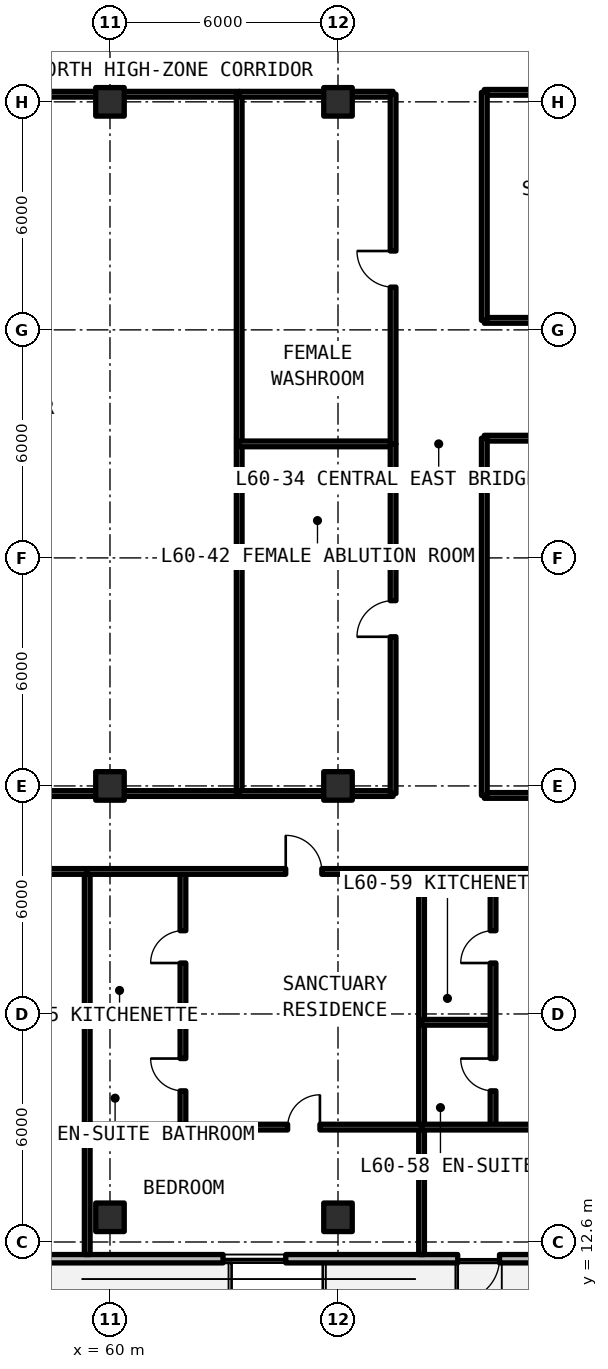
"""IFC4 building model, lengths in metres.
Left out: names, types, materials, properties, quantities, classifications, styles, units other than length and angle.
Written with IfcOpenShell. Run it as: python <this file> out.ifc"""

import sys

from ifc_helpers import new_model, si_unit, direction, frame, frame_2d, origin, origin_2d, place, context, subcontext, project, spatial, rectangle, extrude, element, fill, save


model = new_model("IFC4")
c1 = context("Model", 3, precision=1e-05, world=origin(), true_north=direction((0.0, 1.0)))
c2 = subcontext(c1, "Body", "Model", "MODEL_VIEW")
j1 = project(units=[si_unit("LENGTHUNIT", "METRE"), si_unit("PLANEANGLEUNIT", "RADIAN")], contexts=[c1])
p1 = place(None, origin())
s1 = spatial("IfcSite", under=j1, at=p1, CompositionType="ELEMENT")
p2 = place(p1, origin())
s2 = spatial("IfcBuilding", under=s1, at=p2, CompositionType="ELEMENT")
p3 = place(p2, frame((0.0, 0.0, 215.49)))
s3 = spatial("IfcBuildingStorey", under=s2, at=p3, CompositionType="ELEMENT", Elevation=215.49)
for number, where, z_axis, x_axis in (
    (1, (60.0, 24.6, 0.0), (0.0, 0.0, 1.0), (1.0, 0.0, 0.0)),
    (2, (60.0, 42.6, 0.0), (0.0, 0.0, 1.0), (1.0, 0.0, 0.0)),
    (3, (66.0, 24.6, 0.0), (0.0, 0.0, 1.0), (1.0, 0.0, 0.0)),
    (4, (66.0, 42.6, 0.0), (0.0, 0.0, 1.0), (1.0, 0.0, 0.0)),
    (5, (60.0, 13.25, 0.0), (0.0, 0.0, 1.0), (1.0, 0.0, 0.0)),
    (6, (66.0, 13.25, 0.0), (0.0, 0.0, 1.0), (1.0, 0.0, 0.0)),
):
    element("IfcColumn", number, at=place(p3, frame(where, z_axis=z_axis, x_axis=x_axis)), inside=s3, PredefinedType="COLUMN", context=c2, shape_type="SweptSolid", body=[
        extrude(rectangle(XDim=0.75, YDim=0.75, at=origin_2d()), origin(), (0.0, 0.0, 1.0), 3.63),
    ])
p4 = place(p3, frame((52.11, 12.16, 0.0), z_axis=(0.0, 0.0, 1.0), x_axis=(1.0, 0.0, 0.0)))
e7 = element("IfcWall", 7, at=p4, inside=s3, PredefinedType="SOLIDWALL", context=c2, shape_type="SweptSolid", body=[
    extrude(rectangle(XDim=43.244, YDim=0.22, at=frame_2d((21.622, 0.0))), origin(), (0.0, 0.0, 1.0), 3.41),
])
p5 = place(p4, frame((4.94, 0.0, 0.0)))
e8 = element("IfcOpeningElement", 8, at=p5, cuts=e7, PredefinedType="OPENING", context=c2, shape_type="SweptSolid", body=[
    extrude(rectangle(XDim=1.1, YDim=2.15, at=frame_2d((0.55, 1.075))), frame((0.0, 0.12, 0.0), z_axis=(0.0, -1.0, 0.0), x_axis=(1.0, 0.0, 0.0)), (0.0, 0.0, 1.0), 0.24),
])
p6 = place(p4, frame((17.04, 0.0, 0.0)))
e9 = element("IfcOpeningElement", 9, at=p6, cuts=e7, PredefinedType="OPENING", context=c2, shape_type="SweptSolid", body=[
    extrude(rectangle(XDim=1.1, YDim=2.15, at=frame_2d((0.55, 1.075))), frame((0.0, 0.12, 0.0), z_axis=(0.0, -1.0, 0.0), x_axis=(1.0, 0.0, 0.0)), (0.0, 0.0, 1.0), 0.24),
])
p7 = place(p4, frame((28.89, 0.0, 0.0)))
e10 = element("IfcOpeningElement", 10, at=p7, cuts=e7, PredefinedType="OPENING", context=c2, shape_type="SweptSolid", body=[
    extrude(rectangle(XDim=1.1, YDim=2.15, at=frame_2d((0.55, 1.075))), frame((0.0, 0.12, 0.0), z_axis=(0.0, -1.0, 0.0), x_axis=(1.0, 0.0, 0.0)), (0.0, 0.0, 1.0), 0.24),
])
p8 = place(p4, frame((10.865, 0.0, 0.78)))
e11 = element("IfcOpeningElement", 11, at=p8, cuts=e7, PredefinedType="OPENING", context=c2, shape_type="SweptSolid", body=[
    extrude(rectangle(XDim=1.65, YDim=1.66, at=frame_2d((0.825, 0.83))), frame((0.0, 0.12, 0.0), z_axis=(0.0, -1.0, 0.0), x_axis=(1.0, 0.0, 0.0)), (0.0, 0.0, 1.0), 0.24),
])
p9 = place(p4, frame((38.666, 0.0, 0.78)))
e12 = element("IfcOpeningElement", 12, at=p9, cuts=e7, PredefinedType="OPENING", context=c2, shape_type="SweptSolid", body=[
    extrude(rectangle(XDim=1.65, YDim=1.66, at=frame_2d((0.825, 0.83))), frame((0.0, 0.12, 0.0), z_axis=(0.0, -1.0, 0.0), x_axis=(1.0, 0.0, 0.0)), (0.0, 0.0, 1.0), 0.24),
])
p10 = place(p3, frame((69.85, 24.35, 0.0), z_axis=(0.0, 0.0, 1.0), x_axis=(1.0, 0.0, 0.0)))
e13 = element("IfcWall", 13, at=p10, inside=s3, PredefinedType="SOLIDWALL", context=c2, shape_type="SweptSolid", body=[
    extrude(rectangle(XDim=7.905, YDim=0.15, at=frame_2d((3.952, 0.0))), origin(), (0.0, 0.0, 1.0), 2.63),
])
p11 = place(p3, frame((69.85, 33.75, 0.0), z_axis=(0.0, 0.0, 1.0), x_axis=(1.0, 0.0, 0.0)))
e14 = element("IfcWall", 14, at=p11, inside=s3, PredefinedType="SOLIDWALL", context=c2, shape_type="SweptSolid", body=[
    extrude(rectangle(XDim=7.905, YDim=0.15, at=frame_2d((3.952, 0.0))), origin(), (0.0, 0.0, 1.0), 2.63),
])
p12 = place(p11, frame((3.478, 0.0, 0.0)))
e15 = element("IfcOpeningElement", 15, at=p12, cuts=e14, PredefinedType="OPENING", context=c2, shape_type="SweptSolid", body=[
    extrude(rectangle(XDim=0.95, YDim=2.15, at=frame_2d((0.475, 1.075))), frame((0.0, 0.085, 0.0), z_axis=(0.0, -1.0, 0.0), x_axis=(1.0, 0.0, 0.0)), (0.0, 0.0, 1.0), 0.17),
])
p13 = place(p3, frame((69.85, 24.35, 0.0), z_axis=(0.0, 0.0, 1.0), x_axis=(0.0, 1.0, 0.0)))
e16 = element("IfcWall", 16, at=p13, inside=s3, PredefinedType="SOLIDWALL", context=c2, shape_type="SweptSolid", body=[
    extrude(rectangle(XDim=9.4, YDim=0.15, at=frame_2d((4.7, 0.0))), origin(), (0.0, 0.0, 1.0), 2.63),
])
p14 = place(p3, frame((69.85, 36.85, 0.0), z_axis=(0.0, 0.0, 1.0), x_axis=(1.0, 0.0, 0.0)))
e17 = element("IfcWall", 17, at=p14, inside=s3, PredefinedType="SOLIDWALL", context=c2, shape_type="SweptSolid", body=[
    extrude(rectangle(XDim=7.905, YDim=0.15, at=frame_2d((3.952, 0.0))), origin(), (0.0, 0.0, 1.0), 2.63),
])
p15 = place(p14, frame((3.478, 0.0, 0.0)))
e18 = element("IfcOpeningElement", 18, at=p15, cuts=e17, PredefinedType="OPENING", context=c2, shape_type="SweptSolid", body=[
    extrude(rectangle(XDim=0.95, YDim=2.15, at=frame_2d((0.475, 1.075))), frame((0.0, 0.085, 0.0), z_axis=(0.0, -1.0, 0.0), x_axis=(1.0, 0.0, 0.0)), (0.0, 0.0, 1.0), 0.17),
])
p16 = place(p3, frame((69.85, 42.85, 0.0), z_axis=(0.0, 0.0, 1.0), x_axis=(1.0, 0.0, 0.0)))
e19 = element("IfcWall", 19, at=p16, inside=s3, PredefinedType="SOLIDWALL", context=c2, shape_type="SweptSolid", body=[
    extrude(rectangle(XDim=7.905, YDim=0.15, at=frame_2d((3.952, 0.0))), origin(), (0.0, 0.0, 1.0), 2.63),
])
p17 = place(p3, frame((69.85, 36.85, 0.0), z_axis=(0.0, 0.0, 1.0), x_axis=(0.0, 1.0, 0.0)))
e20 = element("IfcWall", 20, at=p17, inside=s3, PredefinedType="SOLIDWALL", context=c2, shape_type="SweptSolid", body=[
    extrude(rectangle(XDim=6.0, YDim=0.15, at=frame_2d((3.0, 0.0))), origin(), (0.0, 0.0, 1.0), 2.63),
])
p18 = place(p3, frame((50.6, 24.4, 0.0), z_axis=(0.0, 0.0, 1.0), x_axis=(1.0, 0.0, 0.0)))
e21 = element("IfcWall", 21, at=p18, inside=s3, PredefinedType="SOLIDWALL", context=c2, shape_type="SweptSolid", body=[
    extrude(rectangle(XDim=12.8, YDim=0.15, at=frame_2d((6.4, 0.0))), origin(), (0.0, 0.0, 1.0), 2.63),
])
p19 = place(p18, frame((5.7, 0.0, 0.0)))
e22 = element("IfcOpeningElement", 22, at=p19, cuts=e21, PredefinedType="OPENING", context=c2, shape_type="SweptSolid", body=[
    extrude(rectangle(XDim=1.4, YDim=2.15, at=frame_2d((0.7, 1.075))), frame((0.0, 0.085, 0.0), z_axis=(0.0, -1.0, 0.0), x_axis=(1.0, 0.0, 0.0)), (0.0, 0.0, 1.0), 0.17),
])
p20 = place(p3, frame((50.6, 42.8, 0.0), z_axis=(0.0, 0.0, 1.0), x_axis=(1.0, 0.0, 0.0)))
e23 = element("IfcWall", 23, at=p20, inside=s3, PredefinedType="SOLIDWALL", context=c2, shape_type="SweptSolid", body=[
    extrude(rectangle(XDim=12.8, YDim=0.15, at=frame_2d((6.4, 0.0))), origin(), (0.0, 0.0, 1.0), 2.63),
])
p21 = place(p3, frame((63.4, 24.4, 0.0), z_axis=(0.0, 0.0, 1.0), x_axis=(0.0, 1.0, 0.0)))
e24 = element("IfcWall", 24, at=p21, inside=s3, PredefinedType="SOLIDWALL", context=c2, shape_type="SweptSolid", body=[
    extrude(rectangle(XDim=18.4, YDim=0.15, at=frame_2d((9.2, 0.0))), origin(), (0.0, 0.0, 1.0), 2.63),
])
for number, where, z_axis, x_axis in (
    (25, (63.4, 24.4, 0.0), (0.0, 0.0, 1.0), (1.0, 0.0, 0.0)),
    (26, (63.4, 33.6, 0.0), (0.0, 0.0, 1.0), (1.0, 0.0, 0.0)),
):
    element("IfcWall", number, at=place(p3, frame(where, z_axis=z_axis, x_axis=x_axis)), inside=s3, PredefinedType="SOLIDWALL", context=c2, shape_type="SweptSolid", body=[
        extrude(rectangle(XDim=4.05, YDim=0.15, at=frame_2d((2.025, 0.0))), origin(), (0.0, 0.0, 1.0), 2.63),
    ])
p22 = place(p3, frame((67.45, 24.4, 0.0), z_axis=(0.0, 0.0, 1.0), x_axis=(0.0, 1.0, 0.0)))
e27 = element("IfcWall", 27, at=p22, inside=s3, PredefinedType="SOLIDWALL", context=c2, shape_type="SweptSolid", body=[
    extrude(rectangle(XDim=9.2, YDim=0.15, at=frame_2d((4.6, 0.0))), origin(), (0.0, 0.0, 1.0), 2.63),
])
p23 = place(p22, frame((4.125, 0.0, 0.0)))
e28 = element("IfcOpeningElement", 28, at=p23, cuts=e27, PredefinedType="OPENING", context=c2, shape_type="SweptSolid", body=[
    extrude(rectangle(XDim=0.95, YDim=2.15, at=frame_2d((0.475, 1.075))), frame((0.0, 0.085, 0.0), z_axis=(0.0, -1.0, 0.0), x_axis=(1.0, 0.0, 0.0)), (0.0, 0.0, 1.0), 0.17),
])
p24 = place(p3, frame((63.4, 42.8, 0.0), z_axis=(0.0, 0.0, 1.0), x_axis=(1.0, 0.0, 0.0)))
e29 = element("IfcWall", 29, at=p24, inside=s3, PredefinedType="SOLIDWALL", context=c2, shape_type="SweptSolid", body=[
    extrude(rectangle(XDim=4.05, YDim=0.15, at=frame_2d((2.025, 0.0))), origin(), (0.0, 0.0, 1.0), 2.63),
])
p25 = place(p3, frame((67.45, 33.6, 0.0), z_axis=(0.0, 0.0, 1.0), x_axis=(0.0, 1.0, 0.0)))
e30 = element("IfcWall", 30, at=p25, inside=s3, PredefinedType="SOLIDWALL", context=c2, shape_type="SweptSolid", body=[
    extrude(rectangle(XDim=9.2, YDim=0.15, at=frame_2d((4.6, 0.0))), origin(), (0.0, 0.0, 1.0), 2.63),
])
p26 = place(p25, frame((4.125, 0.0, 0.0)))
e31 = element("IfcOpeningElement", 31, at=p26, cuts=e30, PredefinedType="OPENING", context=c2, shape_type="SweptSolid", body=[
    extrude(rectangle(XDim=0.95, YDim=2.15, at=frame_2d((0.475, 1.075))), frame((0.0, 0.085, 0.0), z_axis=(0.0, -1.0, 0.0), x_axis=(1.0, 0.0, 0.0)), (0.0, 0.0, 1.0), 0.17),
])
p27 = place(p3, frame((59.401, 12.27, 0.0), z_axis=(0.0, 0.0, 1.0), x_axis=(0.0, 1.0, 0.0)))
e32 = element("IfcWall", 32, at=p27, inside=s3, PredefinedType="SOLIDWALL", context=c2, shape_type="SweptSolid", body=[
    extrude(rectangle(XDim=10.08, YDim=0.15, at=frame_2d((5.04, 0.0))), origin(), (0.0, 0.0, 1.0), 2.63),
])
p28 = place(p3, frame((52.12, 22.35, 0.0), z_axis=(0.0, 0.0, 1.0), x_axis=(1.0, 0.0, 0.0)))
e33 = element("IfcWall", 33, at=p28, inside=s3, PredefinedType="SOLIDWALL", context=c2, shape_type="SweptSolid", body=[
    extrude(rectangle(XDim=7.281, YDim=0.15, at=frame_2d((3.641, 0.0))), origin(), (0.0, 0.0, 1.0), 2.63),
])
p29 = place(p28, frame((3.166, 0.0, 0.0)))
e34 = element("IfcOpeningElement", 34, at=p29, cuts=e33, PredefinedType="OPENING", context=c2, shape_type="SweptSolid", body=[
    extrude(rectangle(XDim=0.95, YDim=2.15, at=frame_2d((0.475, 1.075))), frame((0.0, 0.085, 0.0), z_axis=(0.0, -1.0, 0.0), x_axis=(1.0, 0.0, 0.0)), (0.0, 0.0, 1.0), 0.17),
])
p30 = place(p3, frame((68.199, 12.27, 0.0), z_axis=(0.0, 0.0, 1.0), x_axis=(0.0, 1.0, 0.0)))
e35 = element("IfcWall", 35, at=p30, inside=s3, PredefinedType="SOLIDWALL", context=c2, shape_type="SweptSolid", body=[
    extrude(rectangle(XDim=10.08, YDim=0.15, at=frame_2d((5.04, 0.0))), origin(), (0.0, 0.0, 1.0), 2.63),
])
p31 = place(p3, frame((59.401, 18.381, 0.0), z_axis=(0.0, 0.0, 1.0), x_axis=(1.0, 0.0, 0.0)))
e36 = element("IfcWall", 36, at=p31, inside=s3, PredefinedType="PARTITIONING", context=c2, shape_type="SweptSolid", body=[
    extrude(rectangle(XDim=2.519, YDim=0.15, at=frame_2d((1.259, 0.0))), origin(), (0.0, 0.0, 1.0), 2.63),
])
p32 = place(p3, frame((61.92, 15.623, 0.0), z_axis=(0.0, 0.0, 1.0), x_axis=(0.0, 1.0, 0.0)))
e37 = element("IfcWall", 37, at=p32, inside=s3, PredefinedType="PARTITIONING", context=c2, shape_type="SweptSolid", body=[
    extrude(rectangle(XDim=6.727, YDim=0.15, at=frame_2d((3.364, 0.0))), origin(), (0.0, 0.0, 1.0), 2.63),
])
p33 = place(p32, frame((0.954, 0.0, 0.0)))
e38 = element("IfcOpeningElement", 38, at=p33, cuts=e37, PredefinedType="OPENING", context=c2, shape_type="SweptSolid", body=[
    extrude(rectangle(XDim=0.85, YDim=2.1, at=frame_2d((0.425, 1.05))), frame((0.0, 0.085, 0.0), z_axis=(0.0, -1.0, 0.0), x_axis=(1.0, 0.0, 0.0)), (0.0, 0.0, 1.0), 0.17),
])
p34 = place(p32, frame((4.318, 0.0, 0.0)))
e39 = element("IfcOpeningElement", 39, at=p34, cuts=e37, PredefinedType="OPENING", context=c2, shape_type="SweptSolid", body=[
    extrude(rectangle(XDim=0.85, YDim=2.1, at=frame_2d((0.425, 1.05))), frame((0.0, 0.085, 0.0), z_axis=(0.0, -1.0, 0.0), x_axis=(1.0, 0.0, 0.0)), (0.0, 0.0, 1.0), 0.17),
])
p35 = place(p3, frame((59.401, 15.623, 0.0), z_axis=(0.0, 0.0, 1.0), x_axis=(1.0, 0.0, 0.0)))
e40 = element("IfcWall", 40, at=p35, inside=s3, PredefinedType="PARTITIONING", context=c2, shape_type="SweptSolid", body=[
    extrude(rectangle(XDim=8.798, YDim=0.15, at=frame_2d((4.399, 0.0))), origin(), (0.0, 0.0, 1.0), 2.63),
])
p36 = place(p35, frame((5.273, 0.0, 0.0)))
e41 = element("IfcOpeningElement", 41, at=p36, cuts=e40, PredefinedType="OPENING", context=c2, shape_type="SweptSolid", body=[
    extrude(rectangle(XDim=0.85, YDim=2.1, at=frame_2d((0.425, 1.05))), frame((0.0, 0.085, 0.0), z_axis=(0.0, -1.0, 0.0), x_axis=(1.0, 0.0, 0.0)), (0.0, 0.0, 1.0), 0.17),
])
p37 = place(p3, frame((59.401, 22.35, 0.0), z_axis=(0.0, 0.0, 1.0), x_axis=(1.0, 0.0, 0.0)))
e42 = element("IfcWall", 42, at=p37, inside=s3, PredefinedType="SOLIDWALL", context=c2, shape_type="SweptSolid", body=[
    extrude(rectangle(XDim=8.798, YDim=0.15, at=frame_2d((4.399, 0.0))), origin(), (0.0, 0.0, 1.0), 2.63),
])
p38 = place(p37, frame((5.223, 0.0, 0.0)))
e43 = element("IfcOpeningElement", 43, at=p38, cuts=e42, PredefinedType="OPENING", context=c2, shape_type="SweptSolid", body=[
    extrude(rectangle(XDim=0.95, YDim=2.15, at=frame_2d((0.475, 1.075))), frame((0.0, 0.085, 0.0), z_axis=(0.0, -1.0, 0.0), x_axis=(1.0, 0.0, 0.0)), (0.0, 0.0, 1.0), 0.17),
])
p39 = place(p3, frame((68.199, 18.381, 0.0), z_axis=(0.0, 0.0, 1.0), x_axis=(1.0, 0.0, 0.0)))
e44 = element("IfcWall", 44, at=p39, inside=s3, PredefinedType="PARTITIONING", context=c2, shape_type="SweptSolid", body=[
    extrude(rectangle(XDim=1.881, YDim=0.15, at=frame_2d((0.94, 0.0))), origin(), (0.0, 0.0, 1.0), 2.63),
])
p40 = place(p3, frame((70.08, 15.623, 0.0), z_axis=(0.0, 0.0, 1.0), x_axis=(0.0, 1.0, 0.0)))
e45 = element("IfcWall", 45, at=p40, inside=s3, PredefinedType="PARTITIONING", context=c2, shape_type="SweptSolid", body=[
    extrude(rectangle(XDim=6.727, YDim=0.15, at=frame_2d((3.364, 0.0))), origin(), (0.0, 0.0, 1.0), 2.63),
])
p41 = place(p40, frame((0.954, 0.0, 0.0)))
e46 = element("IfcOpeningElement", 46, at=p41, cuts=e45, PredefinedType="OPENING", context=c2, shape_type="SweptSolid", body=[
    extrude(rectangle(XDim=0.85, YDim=2.1, at=frame_2d((0.425, 1.05))), frame((0.0, 0.085, 0.0), z_axis=(0.0, -1.0, 0.0), x_axis=(1.0, 0.0, 0.0)), (0.0, 0.0, 1.0), 0.17),
])
p42 = place(p40, frame((4.318, 0.0, 0.0)))
e47 = element("IfcOpeningElement", 47, at=p42, cuts=e45, PredefinedType="OPENING", context=c2, shape_type="SweptSolid", body=[
    extrude(rectangle(XDim=0.85, YDim=2.1, at=frame_2d((0.425, 1.05))), frame((0.0, 0.085, 0.0), z_axis=(0.0, -1.0, 0.0), x_axis=(1.0, 0.0, 0.0)), (0.0, 0.0, 1.0), 0.17),
])
p43 = place(p3, frame((68.199, 15.623, 0.0), z_axis=(0.0, 0.0, 1.0), x_axis=(1.0, 0.0, 0.0)))
e48 = element("IfcWall", 48, at=p43, inside=s3, PredefinedType="PARTITIONING", context=c2, shape_type="SweptSolid", body=[
    extrude(rectangle(XDim=8.798, YDim=0.15, at=frame_2d((4.399, 0.0))), origin(), (0.0, 0.0, 1.0), 2.63),
])
p44 = place(p43, frame((4.954, 0.0, 0.0)))
e49 = element("IfcOpeningElement", 49, at=p44, cuts=e48, PredefinedType="OPENING", context=c2, shape_type="SweptSolid", body=[
    extrude(rectangle(XDim=0.85, YDim=2.1, at=frame_2d((0.425, 1.05))), frame((0.0, 0.085, 0.0), z_axis=(0.0, -1.0, 0.0), x_axis=(1.0, 0.0, 0.0)), (0.0, 0.0, 1.0), 0.17),
])
p45 = place(p3, frame((68.199, 22.35, 0.0), z_axis=(0.0, 0.0, 1.0), x_axis=(1.0, 0.0, 0.0)))
e50 = element("IfcWall", 50, at=p45, inside=s3, PredefinedType="SOLIDWALL", context=c2, shape_type="SweptSolid", body=[
    extrude(rectangle(XDim=8.798, YDim=0.15, at=frame_2d((4.399, 0.0))), origin(), (0.0, 0.0, 1.0), 2.63),
])
p46 = place(p45, frame((4.904, 0.0, 0.0)))
e51 = element("IfcOpeningElement", 51, at=p46, cuts=e50, PredefinedType="OPENING", context=c2, shape_type="SweptSolid", body=[
    extrude(rectangle(XDim=0.95, YDim=2.15, at=frame_2d((0.475, 1.075))), frame((0.0, 0.085, 0.0), z_axis=(0.0, -1.0, 0.0), x_axis=(1.0, 0.0, 0.0)), (0.0, 0.0, 1.0), 0.17),
])
p47 = place(p6, frame((1.1, 0.0, 0.0), z_axis=(0.0, 0.0, 1.0), x_axis=(-1.0, 0.0, 0.0)))
e52 = element("IfcDoor", 52, at=p47, inside=s3, OperationType="SINGLE_SWING_LEFT", PredefinedType="DOOR", context=c2, shape_type="SweptSolid", body=[
    extrude(rectangle(XDim=1.1, YDim=2.15, at=frame_2d((0.55, 1.075))), frame((0.0, 0.025, 0.0), z_axis=(0.0, -1.0, 0.0), x_axis=(1.0, 0.0, 0.0)), (0.0, 0.0, 1.0), 0.05),
])
fill(e9, e52)
p48 = place(p8, origin())
e53 = element("IfcWindow", 53, at=p48, inside=s3, PartitioningType="SINGLE_PANEL", PredefinedType="WINDOW", context=c2, shape_type="SweptSolid", body=[
    extrude(rectangle(XDim=1.65, YDim=1.66, at=frame_2d((0.825, 0.83))), frame((0.0, 0.03, 0.0), z_axis=(0.0, -1.0, 0.0), x_axis=(1.0, 0.0, 0.0)), (0.0, 0.0, 1.0), 0.06),
])
fill(e11, e53)
p49 = place(p23, origin())
e54 = element("IfcDoor", 54, at=p49, inside=s3, OperationType="SINGLE_SWING_LEFT", PredefinedType="DOOR", context=c2, shape_type="SweptSolid", body=[
    extrude(rectangle(XDim=0.95, YDim=2.15, at=frame_2d((0.475, 1.075))), frame((0.0, 0.025, 0.0), z_axis=(0.0, -1.0, 0.0), x_axis=(1.0, 0.0, 0.0)), (0.0, 0.0, 1.0), 0.05),
])
fill(e28, e54)
p50 = place(p26, origin())
e55 = element("IfcDoor", 55, at=p50, inside=s3, OperationType="SINGLE_SWING_RIGHT", PredefinedType="DOOR", context=c2, shape_type="SweptSolid", body=[
    extrude(rectangle(XDim=0.95, YDim=2.15, at=frame_2d((0.475, 1.075))), frame((0.0, 0.025, 0.0), z_axis=(0.0, -1.0, 0.0), x_axis=(1.0, 0.0, 0.0)), (0.0, 0.0, 1.0), 0.05),
])
fill(e31, e55)
p51 = place(p33, origin())
e56 = element("IfcDoor", 56, at=p51, inside=s3, OperationType="SINGLE_SWING_RIGHT", PredefinedType="DOOR", context=c2, shape_type="SweptSolid", body=[
    extrude(rectangle(XDim=0.85, YDim=2.1, at=frame_2d((0.425, 1.05))), frame((0.0, 0.025, 0.0), z_axis=(0.0, -1.0, 0.0), x_axis=(1.0, 0.0, 0.0)), (0.0, 0.0, 1.0), 0.05),
])
fill(e38, e56)
p52 = place(p34, origin())
e57 = element("IfcDoor", 57, at=p52, inside=s3, OperationType="SINGLE_SWING_LEFT", PredefinedType="DOOR", context=c2, shape_type="SweptSolid", body=[
    extrude(rectangle(XDim=0.85, YDim=2.1, at=frame_2d((0.425, 1.05))), frame((0.0, 0.025, 0.0), z_axis=(0.0, -1.0, 0.0), x_axis=(1.0, 0.0, 0.0)), (0.0, 0.0, 1.0), 0.05),
])
fill(e39, e57)
p53 = place(p36, origin())
e58 = element("IfcDoor", 58, at=p53, inside=s3, OperationType="SINGLE_SWING_RIGHT", PredefinedType="DOOR", context=c2, shape_type="SweptSolid", body=[
    extrude(rectangle(XDim=0.85, YDim=2.1, at=frame_2d((0.425, 1.05))), frame((0.0, 0.025, 0.0), z_axis=(0.0, -1.0, 0.0), x_axis=(1.0, 0.0, 0.0)), (0.0, 0.0, 1.0), 0.05),
])
fill(e41, e58)
p54 = place(p38, origin())
e59 = element("IfcDoor", 59, at=p54, inside=s3, OperationType="SINGLE_SWING_LEFT", PredefinedType="DOOR", context=c2, shape_type="SweptSolid", body=[
    extrude(rectangle(XDim=0.95, YDim=2.15, at=frame_2d((0.475, 1.075))), frame((0.0, 0.025, 0.0), z_axis=(0.0, -1.0, 0.0), x_axis=(1.0, 0.0, 0.0)), (0.0, 0.0, 1.0), 0.05),
])
fill(e43, e59)
p55 = place(p41, origin())
e60 = element("IfcDoor", 60, at=p55, inside=s3, OperationType="SINGLE_SWING_RIGHT", PredefinedType="DOOR", context=c2, shape_type="SweptSolid", body=[
    extrude(rectangle(XDim=0.85, YDim=2.1, at=frame_2d((0.425, 1.05))), frame((0.0, 0.025, 0.0), z_axis=(0.0, -1.0, 0.0), x_axis=(1.0, 0.0, 0.0)), (0.0, 0.0, 1.0), 0.05),
])
fill(e46, e60)
p56 = place(p42, origin())
e61 = element("IfcDoor", 61, at=p56, inside=s3, OperationType="SINGLE_SWING_LEFT", PredefinedType="DOOR", context=c2, shape_type="SweptSolid", body=[
    extrude(rectangle(XDim=0.85, YDim=2.1, at=frame_2d((0.425, 1.05))), frame((0.0, 0.025, 0.0), z_axis=(0.0, -1.0, 0.0), x_axis=(1.0, 0.0, 0.0)), (0.0, 0.0, 1.0), 0.05),
])
fill(e47, e61)
save(model, sys.argv[1])
